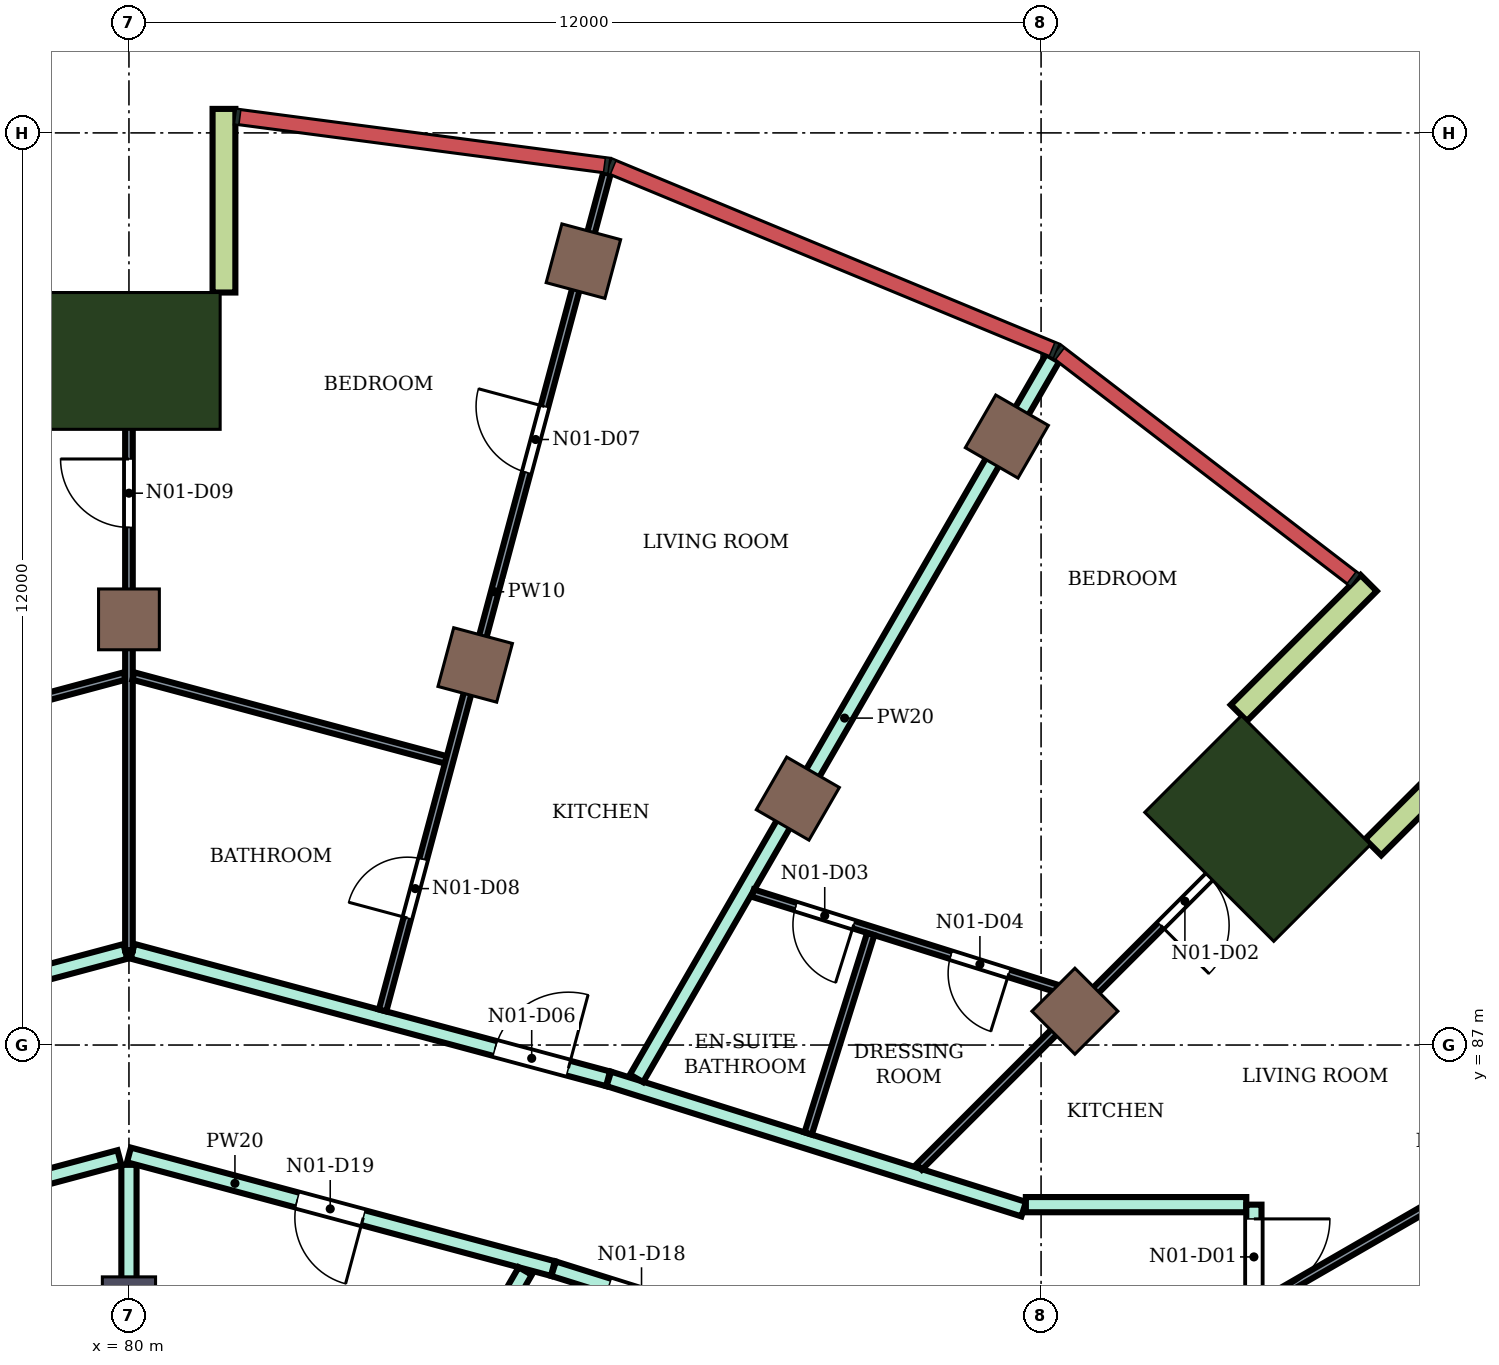
"""IFC4 building model, lengths in metres.
Left out: names, types, materials, properties, quantities, classifications, styles, units other than length and angle.
Written with IfcOpenShell. Run it as: python <this file> out.ifc"""

import sys

from ifc_helpers import new_model, si_unit, direction, frame, frame_2d, origin, origin_2d, place, context, subcontext, project, spatial, rectangle, extrude, element, fill, save


model = new_model("IFC4")
c1 = context("Model", 3, precision=1e-05, world=origin(), true_north=direction((0.0, 1.0)))
c2 = subcontext(c1, "Body", "Model", "MODEL_VIEW")
j1 = project(units=[si_unit("LENGTHUNIT", "METRE"), si_unit("PLANEANGLEUNIT", "RADIAN")], contexts=[c1])
p1 = place(None, origin())
s1 = spatial("IfcSite", under=j1, at=p1, CompositionType="ELEMENT")
p2 = place(p1, origin())
s2 = spatial("IfcBuilding", under=s1, at=p2, CompositionType="ELEMENT")
p3 = place(p2, frame((0.0, 0.0, 279.9)))
s3 = spatial("IfcBuildingStorey", under=s2, at=p3, CompositionType="ELEMENT", Elevation=279.9)
for number, where, z_axis, x_axis in (
    (1, (91.55, 95.005, 0.0), (0.0, 0.0, 1.0), (0.5, 0.866, 0.0)),
    (2, (85.979, 97.313, 0.0), (0.0, 0.0, 1.0), (0.259, 0.966, 0.0)),
    (3, (92.445, 87.445, 0.0), (0.0, 0.0, 1.0), (0.707, 0.707, 0.0)),
    (4, (88.8, 90.242, 0.0), (0.0, 0.0, 1.0), (0.5, 0.866, 0.0)),
    (5, (84.555, 92.0, 0.0), (0.0, 0.0, 1.0), (0.259, 0.966, 0.0)),
    (6, (80.0, 92.6, 0.0), (0.0, 0.0, 1.0), (0.0, 1.0, 0.0)),
):
    element("IfcColumn", number, at=place(p3, frame(where, z_axis=z_axis, x_axis=x_axis)), inside=s3, PredefinedType="COLUMN", context=c2, shape_type="SweptSolid", body=[
        extrude(rectangle(XDim=0.8, YDim=0.8, at=origin_2d()), origin(), (0.0, 0.0, 1.0), 4.2),
    ])
p4 = place(p3, frame((80.0, 83.6, 0.0), z_axis=(0.0, 0.0, 1.0), x_axis=(0.0, 1.0, 0.0)))
e7 = element("IfcColumn", 7, at=p4, inside=s3, PredefinedType="COLUMN", context=c2, shape_type="SweptSolid", body=[
    extrude(rectangle(XDim=0.7, YDim=0.7, at=origin_2d()), origin(), (0.0, 0.0, 1.0), 4.2),
])
for number, where, z_axis, x_axis in (
    (8, (94.849, 89.849, 0.0), (0.0, 0.0, 1.0), (0.707, 0.707, 0.0)),
    (9, (80.0, 96.0, 0.0), (0.0, 0.0, 1.0), (0.0, 1.0, 0.0)),
):
    element("IfcColumn", number, at=place(p3, frame(where, z_axis=z_axis, x_axis=x_axis)), inside=s3, PredefinedType="COLUMN", context=c2, shape_type="SweptSolid", body=[
        extrude(rectangle(XDim=1.8, YDim=2.4, at=origin_2d()), origin(), (0.0, 0.0, 1.0), 4.2),
    ])
for number, where, z_axis, x_axis in (
    (10, (96.37, 89.602, 0.0), (0.0, 0.0, 1.0), (0.707, 0.707, 0.0)),
    (11, (94.602, 91.37, 0.0), (0.0, 0.0, 1.0), (0.707, 0.707, 0.0)),
):
    element("IfcWall", number, at=place(p3, frame(where, z_axis=z_axis, x_axis=x_axis)), inside=s3, PredefinedType="NOTDEFINED", context=c2, shape_type="SweptSolid", body=[
        extrude(rectangle(XDim=2.416, YDim=0.3, at=frame_2d((1.208, 0.0))), origin(), (0.0, 0.0, 1.0), 4.2),
    ])
p5 = place(p3, frame((81.25, 96.9, 0.0), z_axis=(0.0, 0.0, 1.0), x_axis=(0.0, 1.0, 0.0)))
e12 = element("IfcWall", 12, at=p5, inside=s3, PredefinedType="NOTDEFINED", context=c2, shape_type="SweptSolid", body=[
    extrude(rectangle(XDim=2.416, YDim=0.3, at=frame_2d((1.208, 0.0))), origin(), (0.0, 0.0, 1.0), 4.2),
])
p6 = place(p3, frame((73.687, 86.554, 0.0), z_axis=(0.0, 0.0, 1.0), x_axis=(0.966002126521, 0.258534120682, 0.0)))
e13 = element("IfcWall", 13, at=p6, inside=s3, PredefinedType="PARTITIONING", context=c2, shape_type="SweptSolid", body=[
    extrude(rectangle(XDim=6.486, YDim=0.2, at=frame_2d((3.243, 0.0))), origin(), (0.0, 0.0, 1.0), 3.75),
])
p7 = place(p3, frame((74.413, 84.057, 0.0), z_axis=(0.0, 0.0, 1.0), x_axis=(0.965972135939, 0.258646153246, 0.0)))
e14 = element("IfcWall", 14, at=p7, inside=s3, PredefinedType="PARTITIONING", context=c2, shape_type="SweptSolid", body=[
    extrude(rectangle(XDim=5.654, YDim=0.2, at=frame_2d((2.827, 0.0))), origin(), (0.0, 0.0, 1.0), 3.75),
])
p8 = place(p7, frame((2.593, 0.0, 0.0)))
e15 = element("IfcOpeningElement", 15, at=p8, cuts=e14, PredefinedType="OPENING", context=c2, shape_type="SweptSolid", body=[
    extrude(rectangle(XDim=0.9, YDim=2.1, at=frame_2d((0.45, 1.05))), frame((0.0, 0.11, 0.0), z_axis=(0.0, -1.0, 0.0), x_axis=(1.0, 0.0, 0.0)), (0.0, 0.0, 1.0), 0.22),
])
p9 = place(p3, frame((80.0, 82.699, 0.0), z_axis=(0.0, 0.0, 1.0), x_axis=(0.0, 1.0, 0.0)))
e16 = element("IfcWall", 16, at=p9, inside=s3, PredefinedType="PARTITIONING", context=c2, shape_type="SweptSolid", body=[
    extrude(rectangle(XDim=2.725, YDim=0.2, at=frame_2d((1.363, 0.0))), origin(), (0.0, 0.0, 1.0), 3.75),
])
p10 = place(p3, frame((80.0, 85.554, 0.0), z_axis=(0.0, 0.0, 1.0), x_axis=(0.965928989968, -0.258807237802, 0.0)))
e17 = element("IfcWall", 17, at=p10, inside=s3, PredefinedType="PARTITIONING", context=c2, shape_type="SweptSolid", body=[
    extrude(rectangle(XDim=5.774, YDim=0.2, at=frame_2d((2.887, 0.0))), origin(), (0.0, 0.0, 1.0), 3.75),
])
p11 = place(p10, frame((2.292, 0.0, 0.0)))
e18 = element("IfcOpeningElement", 18, at=p11, cuts=e17, PredefinedType="OPENING", context=c2, shape_type="SweptSolid", body=[
    extrude(rectangle(XDim=0.9, YDim=2.1, at=frame_2d((0.45, 1.05))), frame((0.0, 0.11, 0.0), z_axis=(0.0, -1.0, 0.0), x_axis=(1.0, 0.0, 0.0)), (0.0, 0.0, 1.0), 0.22),
])
p12 = place(p3, frame((80.048, 88.233, 0.0), z_axis=(0.0, 0.0, 1.0), x_axis=(0.965865387308, -0.259044501198, 0.0)))
e19 = element("IfcWall", 19, at=p12, inside=s3, PredefinedType="PARTITIONING", context=c2, shape_type="SweptSolid", body=[
    extrude(rectangle(XDim=6.476, YDim=0.2, at=frame_2d((3.238, 0.0))), origin(), (0.0, 0.0, 1.0), 3.75),
])
p13 = place(p12, frame((4.936, 0.0, 0.0)))
e20 = element("IfcOpeningElement", 20, at=p13, cuts=e19, PredefinedType="OPENING", context=c2, shape_type="SweptSolid", body=[
    extrude(rectangle(XDim=1.0, YDim=2.1, at=frame_2d((0.5, 1.05))), frame((0.0, 0.11, 0.0), z_axis=(0.0, -1.0, 0.0), x_axis=(1.0, 0.0, 0.0)), (0.0, 0.0, 1.0), 0.22),
])
p14 = place(p3, frame((83.85, 81.666, 0.0), z_axis=(0.0, 0.0, 1.0), x_axis=(0.500146274735, 0.865940935554, 0.0)))
e21 = element("IfcWall", 21, at=p14, inside=s3, PredefinedType="PARTITIONING", context=c2, shape_type="SweptSolid", body=[
    extrude(rectangle(XDim=2.726, YDim=0.2, at=frame_2d((1.363, 0.0))), origin(), (0.0, 0.0, 1.0), 3.75),
])
p15 = place(p3, frame((85.587, 84.057, 0.0), z_axis=(0.0, 0.0, 1.0), x_axis=(0.954239513179, -0.299043393987, 0.0)))
e22 = element("IfcWall", 22, at=p15, inside=s3, PredefinedType="PARTITIONING", context=c2, shape_type="SweptSolid", body=[
    extrude(rectangle(XDim=2.424, YDim=0.2, at=frame_2d((1.212, 0.0))), origin(), (0.0, 0.0, 1.0), 3.75),
])
p16 = place(p15, frame((0.762, 0.0, 0.0)))
e23 = element("IfcOpeningElement", 23, at=p16, cuts=e22, PredefinedType="OPENING", context=c2, shape_type="SweptSolid", body=[
    extrude(rectangle(XDim=0.9, YDim=2.1, at=frame_2d((0.45, 1.05))), frame((0.0, 0.11, 0.0), z_axis=(0.0, -1.0, 0.0), x_axis=(1.0, 0.0, 0.0)), (0.0, 0.0, 1.0), 0.22),
])
p17 = place(p3, frame((86.313, 86.554, 0.0), z_axis=(0.0, 0.0, 1.0), x_axis=(0.954089584911, -0.299521391497, 0.0)))
e24 = element("IfcWall", 24, at=p17, inside=s3, PredefinedType="PARTITIONING", context=c2, shape_type="SweptSolid", body=[
    extrude(rectangle(XDim=5.72, YDim=0.2, at=frame_2d((2.86, 0.0))), origin(), (0.0, 0.0, 1.0), 3.75),
])
p18 = place(p3, frame((86.678, 86.562, 0.0), z_axis=(0.0, 0.0, 1.0), x_axis=(0.500133037155, 0.865948581122, 0.0)))
e25 = element("IfcWall", 25, at=p18, inside=s3, PredefinedType="PARTITIONING", context=c2, shape_type="SweptSolid", body=[
    extrude(rectangle(XDim=10.946, YDim=0.2, at=frame_2d((5.473, 0.0))), origin(), (0.0, 0.0, 1.0), 3.75),
])
p19 = place(p3, frame((91.8, 84.9, 0.0), z_axis=(0.0, 0.0, 1.0), x_axis=(1.0, 0.0, 0.0)))
e26 = element("IfcWall", 26, at=p19, inside=s3, PredefinedType="PARTITIONING", context=c2, shape_type="SweptSolid", body=[
    extrude(rectangle(XDim=2.9, YDim=0.2, at=frame_2d((1.45, 0.0))), origin(), (0.0, 0.0, 1.0), 3.75),
])
p20 = place(p3, frame((94.8, 83.65, 0.0), z_axis=(0.0, 0.0, 1.0), x_axis=(0.0, 1.0, 0.0)))
e27 = element("IfcWall", 27, at=p20, inside=s3, PredefinedType="PARTITIONING", context=c2, shape_type="SweptSolid", body=[
    extrude(rectangle(XDim=1.25, YDim=0.2, at=frame_2d((0.625, 0.0))), origin(), (0.0, 0.0, 1.0), 3.75),
])
p21 = place(p20, frame((0.062, 0.0, 0.0)))
e28 = element("IfcOpeningElement", 28, at=p21, cuts=e27, PredefinedType="OPENING", context=c2, shape_type="SweptSolid", body=[
    extrude(rectangle(XDim=1.0, YDim=2.1, at=frame_2d((0.5, 1.05))), frame((0.0, 0.11, 0.0), z_axis=(0.0, -1.0, 0.0), x_axis=(1.0, 0.0, 0.0)), (0.0, 0.0, 1.0), 0.22),
])
p22 = place(p3, frame((75.832, 90.752, 0.0), z_axis=(0.0, 0.0, 1.0), x_axis=(0.965856843682, 0.259076354601, 0.0)))
e29 = element("IfcWall", 29, at=p22, inside=s3, PredefinedType="PARTITIONING", context=c2, shape_type="SweptSolid", body=[
    extrude(rectangle(XDim=4.256, YDim=0.1, at=frame_2d((2.128, 0.0))), origin(), (0.0, 0.0, 1.0), 3.75),
])
p23 = place(p22, frame((1.733, 0.0, 0.0)))
e30 = element("IfcOpeningElement", 30, at=p23, cuts=e29, PredefinedType="OPENING", context=c2, shape_type="SweptSolid", body=[
    extrude(rectangle(XDim=0.8, YDim=2.1, at=frame_2d((0.4, 1.05))), frame((0.0, 0.06, 0.0), z_axis=(0.0, -1.0, 0.0), x_axis=(1.0, 0.0, 0.0)), (0.0, 0.0, 1.0), 0.12),
])
p24 = place(p3, frame((80.0, 88.246, 0.0), z_axis=(0.0, 0.0, 1.0), x_axis=(0.0, 1.0, 0.0)))
e31 = element("IfcWall", 31, at=p24, inside=s3, PredefinedType="PARTITIONING", context=c2, shape_type="SweptSolid", body=[
    extrude(rectangle(XDim=8.454, YDim=0.1, at=frame_2d((4.227, 0.0))), origin(), (0.0, 0.0, 1.0), 3.75),
])
p25 = place(p24, frame((5.564, 0.0, 0.0)))
e32 = element("IfcOpeningElement", 32, at=p25, cuts=e31, PredefinedType="OPENING", context=c2, shape_type="SweptSolid", body=[
    extrude(rectangle(XDim=0.9, YDim=2.1, at=frame_2d((0.45, 1.05))), frame((0.0, 0.06, 0.0), z_axis=(0.0, -1.0, 0.0), x_axis=(1.0, 0.0, 0.0)), (0.0, 0.0, 1.0), 0.12),
])
p26 = place(p3, frame((80.058, 91.854, 0.0), z_axis=(0.0, 0.0, 1.0), x_axis=(0.96586069397, -0.259061999998, 0.0)))
e33 = element("IfcWall", 33, at=p26, inside=s3, PredefinedType="PARTITIONING", context=c2, shape_type="SweptSolid", body=[
    extrude(rectangle(XDim=4.256, YDim=0.1, at=frame_2d((2.128, 0.0))), origin(), (0.0, 0.0, 1.0), 3.75),
])
p27 = place(p3, frame((83.337, 87.455, 0.0), z_axis=(0.0, 0.0, 1.0), x_axis=(0.25887234328, 0.965911543509, 0.0)))
e34 = element("IfcWall", 34, at=p27, inside=s3, PredefinedType="PARTITIONING", context=c2, shape_type="SweptSolid", body=[
    extrude(rectangle(XDim=11.404, YDim=0.1, at=frame_2d((5.702, 0.0))), origin(), (0.0, 0.0, 1.0), 3.75),
])
p28 = place(p27, frame((7.326, 0.0, 0.0)))
e35 = element("IfcOpeningElement", 35, at=p28, cuts=e34, PredefinedType="OPENING", context=c2, shape_type="SweptSolid", body=[
    extrude(rectangle(XDim=0.9, YDim=2.1, at=frame_2d((0.45, 1.05))), frame((0.0, 0.06, 0.0), z_axis=(0.0, -1.0, 0.0), x_axis=(1.0, 0.0, 0.0)), (0.0, 0.0, 1.0), 0.12),
])
p29 = place(p27, frame((1.26, 0.0, 0.0)))
e36 = element("IfcOpeningElement", 36, at=p29, cuts=e34, PredefinedType="OPENING", context=c2, shape_type="SweptSolid", body=[
    extrude(rectangle(XDim=0.8, YDim=2.1, at=frame_2d((0.4, 1.05))), frame((0.0, 0.06, 0.0), z_axis=(0.0, -1.0, 0.0), x_axis=(1.0, 0.0, 0.0)), (0.0, 0.0, 1.0), 0.12),
])
p30 = place(p3, frame((88.207, 88.999, 0.0), z_axis=(0.0, 0.0, 1.0), x_axis=(0.954166656768, -0.29927577769, 0.0)))
e37 = element("IfcWall", 37, at=p30, inside=s3, PredefinedType="PARTITIONING", context=c2, shape_type="SweptSolid", body=[
    extrude(rectangle(XDim=4.542, YDim=0.1, at=frame_2d((2.271, 0.0))), origin(), (0.0, 0.0, 1.0), 3.75),
])
p31 = place(p30, frame((0.592, 0.0, 0.0)))
e38 = element("IfcOpeningElement", 38, at=p31, cuts=e37, PredefinedType="OPENING", context=c2, shape_type="SweptSolid", body=[
    extrude(rectangle(XDim=0.8, YDim=2.1, at=frame_2d((0.4, 1.05))), frame((0.0, 0.06, 0.0), z_axis=(0.0, -1.0, 0.0), x_axis=(1.0, 0.0, 0.0)), (0.0, 0.0, 1.0), 0.12),
])
p32 = place(p30, frame((2.732, 0.0, 0.0)))
e39 = element("IfcOpeningElement", 39, at=p32, cuts=e37, PredefinedType="OPENING", context=c2, shape_type="SweptSolid", body=[
    extrude(rectangle(XDim=0.8, YDim=2.1, at=frame_2d((0.4, 1.05))), frame((0.0, 0.06, 0.0), z_axis=(0.0, -1.0, 0.0), x_axis=(1.0, 0.0, 0.0)), (0.0, 0.0, 1.0), 0.12),
])
p33 = place(p3, frame((88.936, 85.836, 0.0), z_axis=(0.0, 0.0, 1.0), x_axis=(0.299371771011, 0.954136543018, 0.0)))
e40 = element("IfcWall", 40, at=p33, inside=s3, PredefinedType="PARTITIONING", context=c2, shape_type="SweptSolid", body=[
    extrude(rectangle(XDim=2.75, YDim=0.1, at=frame_2d((1.375, 0.0))), origin(), (0.0, 0.0, 1.0), 3.75),
])
p34 = place(p3, frame((90.395, 85.395, 0.0), z_axis=(0.0, 0.0, 1.0), x_axis=(0.707106781187, 0.707106781187, 0.0)))
e41 = element("IfcWall", 41, at=p34, inside=s3, PredefinedType="PARTITIONING", context=c2, shape_type="SweptSolid", body=[
    extrude(rectangle(XDim=7.0, YDim=0.1, at=frame_2d((3.5, 0.0))), origin(), (0.0, 0.0, 1.0), 3.75),
])
p35 = place(p34, frame((4.496, 0.0, 0.0)))
e42 = element("IfcOpeningElement", 42, at=p35, cuts=e41, PredefinedType="OPENING", context=c2, shape_type="SweptSolid", body=[
    extrude(rectangle(XDim=0.9, YDim=2.1, at=frame_2d((0.45, 1.05))), frame((0.0, 0.06, 0.0), z_axis=(0.0, -1.0, 0.0), x_axis=(1.0, 0.0, 0.0)), (0.0, 0.0, 1.0), 0.12),
])
p36 = place(p3, frame((94.8, 83.545, 0.0), z_axis=(0.0, 0.0, 1.0), x_axis=(0.866044015472, 0.499967762227, 0.0)))
e43 = element("IfcWall", 43, at=p36, inside=s3, PredefinedType="PARTITIONING", context=c2, shape_type="SweptSolid", body=[
    extrude(rectangle(XDim=7.208, YDim=0.1, at=frame_2d((3.604, 0.0))), origin(), (0.0, 0.0, 1.0), 3.75),
])
p37 = place(p36, frame((3.129, 0.0, 0.0)))
e44 = element("IfcOpeningElement", 44, at=p37, cuts=e43, PredefinedType="OPENING", context=c2, shape_type="SweptSolid", body=[
    extrude(rectangle(XDim=0.9, YDim=2.1, at=frame_2d((0.45, 1.05))), frame((0.0, 0.06, 0.0), z_axis=(0.0, -1.0, 0.0), x_axis=(1.0, 0.0, 0.0)), (0.0, 0.0, 1.0), 0.12),
])
p38 = place(p21, frame((1.0, 0.0, 0.0), z_axis=(0.0, 0.0, 1.0), x_axis=(-1.0, 0.0, 0.0)))
e45 = element("IfcDoor", 45, at=p38, inside=s3, OperationType="SINGLE_SWING_LEFT", PredefinedType="DOOR", context=c2, shape_type="SweptSolid", body=[
    extrude(rectangle(XDim=1.0, YDim=2.1, at=frame_2d((0.5, 1.05))), frame((0.0, 0.025, 0.0), z_axis=(0.0, -1.0, 0.0), x_axis=(1.0, 0.0, 0.0)), (0.0, 0.0, 1.0), 0.05),
])
fill(e28, e45)
p39 = place(p35, frame((0.9, 0.0, 0.0), z_axis=(0.0, 0.0, 1.0), x_axis=(-1.0, 0.0, 0.0)))
e46 = element("IfcDoor", 46, at=p39, inside=s3, OperationType="SINGLE_SWING_RIGHT", PredefinedType="DOOR", context=c2, shape_type="SweptSolid", body=[
    extrude(rectangle(XDim=0.9, YDim=2.1, at=frame_2d((0.45, 1.05))), frame((0.0, 0.025, 0.0), z_axis=(0.0, -1.0, 0.0), x_axis=(1.0, 0.0, 0.0)), (0.0, 0.0, 1.0), 0.05),
])
fill(e42, e46)
p40 = place(p31, frame((0.8, 0.0, 0.0), z_axis=(0.0, 0.0, 1.0), x_axis=(-1.0, 0.0, 0.0)))
e47 = element("IfcDoor", 47, at=p40, inside=s3, OperationType="SINGLE_SWING_LEFT", PredefinedType="DOOR", context=c2, shape_type="SweptSolid", body=[
    extrude(rectangle(XDim=0.8, YDim=2.1, at=frame_2d((0.4, 1.05))), frame((0.0, 0.025, 0.0), z_axis=(0.0, -1.0, 0.0), x_axis=(1.0, 0.0, 0.0)), (0.0, 0.0, 1.0), 0.05),
])
fill(e38, e47)
p41 = place(p32, frame((0.8, 0.0, 0.0), z_axis=(0.0, 0.0, 1.0), x_axis=(-1.0, 0.0, 0.0)))
e48 = element("IfcDoor", 48, at=p41, inside=s3, OperationType="SINGLE_SWING_LEFT", PredefinedType="DOOR", context=c2, shape_type="SweptSolid", body=[
    extrude(rectangle(XDim=0.8, YDim=2.1, at=frame_2d((0.4, 1.05))), frame((0.0, 0.025, 0.0), z_axis=(0.0, -1.0, 0.0), x_axis=(1.0, 0.0, 0.0)), (0.0, 0.0, 1.0), 0.05),
])
fill(e39, e48)
p42 = place(p13, origin())
e49 = element("IfcDoor", 49, at=p42, inside=s3, OperationType="SINGLE_SWING_RIGHT", PredefinedType="DOOR", context=c2, shape_type="SweptSolid", body=[
    extrude(rectangle(XDim=1.0, YDim=2.1, at=frame_2d((0.5, 1.05))), frame((0.0, 0.025, 0.0), z_axis=(0.0, -1.0, 0.0), x_axis=(1.0, 0.0, 0.0)), (0.0, 0.0, 1.0), 0.05),
])
fill(e20, e49)
p43 = place(p28, origin())
e50 = element("IfcDoor", 50, at=p43, inside=s3, OperationType="SINGLE_SWING_RIGHT", PredefinedType="DOOR", context=c2, shape_type="SweptSolid", body=[
    extrude(rectangle(XDim=0.9, YDim=2.1, at=frame_2d((0.45, 1.05))), frame((0.0, 0.025, 0.0), z_axis=(0.0, -1.0, 0.0), x_axis=(1.0, 0.0, 0.0)), (0.0, 0.0, 1.0), 0.05),
])
fill(e35, e50)
p44 = place(p29, origin())
e51 = element("IfcDoor", 51, at=p44, inside=s3, OperationType="SINGLE_SWING_LEFT", PredefinedType="DOOR", context=c2, shape_type="SweptSolid", body=[
    extrude(rectangle(XDim=0.8, YDim=2.1, at=frame_2d((0.4, 1.05))), frame((0.0, 0.025, 0.0), z_axis=(0.0, -1.0, 0.0), x_axis=(1.0, 0.0, 0.0)), (0.0, 0.0, 1.0), 0.05),
])
fill(e36, e51)
p45 = place(p25, origin())
e52 = element("IfcDoor", 52, at=p45, inside=s3, OperationType="SINGLE_SWING_RIGHT", PredefinedType="DOOR", context=c2, shape_type="SweptSolid", body=[
    extrude(rectangle(XDim=0.9, YDim=2.1, at=frame_2d((0.45, 1.05))), frame((0.0, 0.025, 0.0), z_axis=(0.0, -1.0, 0.0), x_axis=(1.0, 0.0, 0.0)), (0.0, 0.0, 1.0), 0.05),
])
fill(e32, e52)
p46 = place(p16, frame((0.9, 0.0, 0.0), z_axis=(0.0, 0.0, 1.0), x_axis=(-1.0, 0.0, 0.0)))
e53 = element("IfcDoor", 53, at=p46, inside=s3, OperationType="SINGLE_SWING_LEFT", PredefinedType="DOOR", context=c2, shape_type="SweptSolid", body=[
    extrude(rectangle(XDim=0.9, YDim=2.1, at=frame_2d((0.45, 1.05))), frame((0.0, 0.025, 0.0), z_axis=(0.0, -1.0, 0.0), x_axis=(1.0, 0.0, 0.0)), (0.0, 0.0, 1.0), 0.05),
])
fill(e23, e53)
p47 = place(p11, frame((0.9, 0.0, 0.0), z_axis=(0.0, 0.0, 1.0), x_axis=(-1.0, 0.0, 0.0)))
e54 = element("IfcDoor", 54, at=p47, inside=s3, OperationType="SINGLE_SWING_LEFT", PredefinedType="DOOR", context=c2, shape_type="SweptSolid", body=[
    extrude(rectangle(XDim=0.9, YDim=2.1, at=frame_2d((0.45, 1.05))), frame((0.0, 0.025, 0.0), z_axis=(0.0, -1.0, 0.0), x_axis=(1.0, 0.0, 0.0)), (0.0, 0.0, 1.0), 0.05),
])
fill(e18, e54)
save(model, sys.argv[1])
